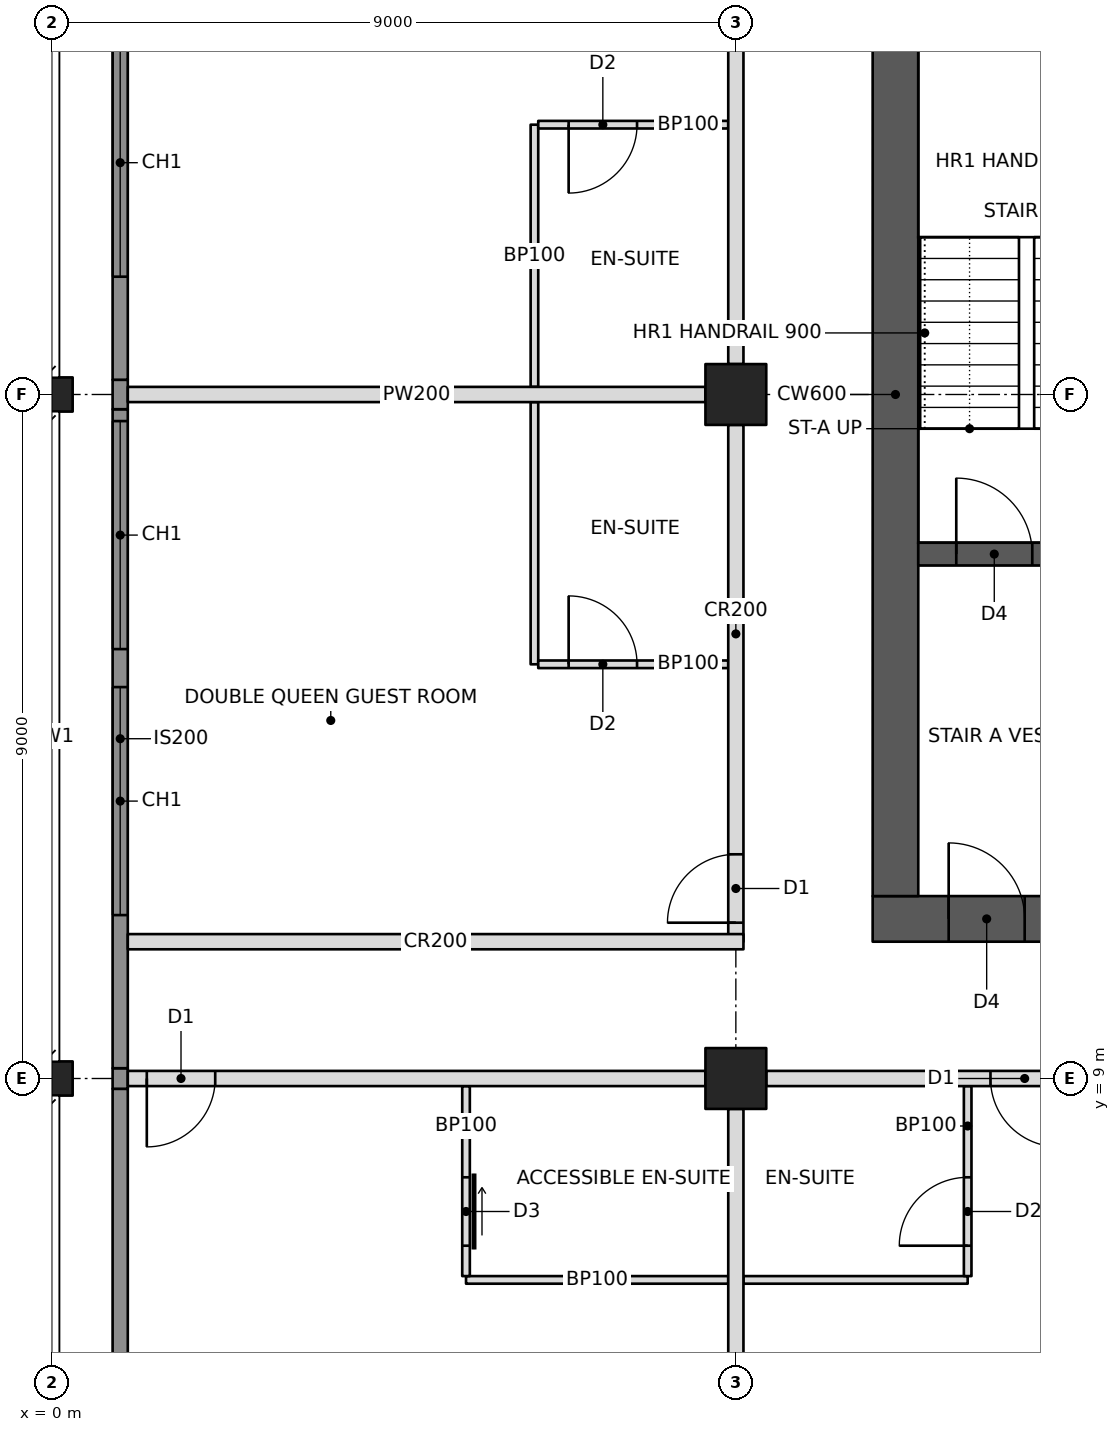
"""IFC4 building model, lengths in metres.
Left out: names, types, materials, properties, quantities, classifications, styles, units other than length and angle.
Written with IfcOpenShell. Run it as: python <this file> out.ifc"""

import sys

from ifc_helpers import new_model, si_unit, direction, frame, frame_2d, origin, origin_2d, place, context, subcontext, project, spatial, rectangle, hollow_rectangle, i_section, extrude, element, fill, save


model = new_model("IFC4")
c1 = context("Model", 3, precision=1e-05, world=origin(), true_north=direction((0.0, 1.0)))
c2 = subcontext(c1, "Body", "Model", "MODEL_VIEW")
j1 = project(units=[si_unit("LENGTHUNIT", "METRE"), si_unit("PLANEANGLEUNIT", "RADIAN")], contexts=[c1])
p1 = place(None, origin())
s1 = spatial("IfcSite", under=j1, at=p1, CompositionType="ELEMENT")
p2 = place(p1, origin())
s2 = spatial("IfcBuilding", under=s1, at=p2, CompositionType="ELEMENT")
p3 = place(p2, frame((0.0, 0.0, 187.6)))
s3 = spatial("IfcBuildingStorey", under=s2, at=p3, CompositionType="ELEMENT", Elevation=187.6)
for number, where, z_axis, x_axis in (
    (1, (0.0, 9.0, 0.0), (0.0, 0.0, 1.0), (0.0, 1.0, 0.0)),
    (2, (0.0, 18.0, 0.0), (0.0, 0.0, 1.0), (0.0, 1.0, 0.0)),
):
    element("IfcColumn", number, at=place(p3, frame(where, z_axis=z_axis, x_axis=x_axis)), inside=s3, PredefinedType="COLUMN", context=c2, shape_type="SweptSolid", body=[
        extrude(i_section(OverallWidth=0.449, OverallDepth=0.549, WebThickness=0.072, FlangeThickness=0.115, at=origin_2d()), origin(), (0.0, 0.0, 1.0), 3.4),
    ])
for number, where, z_axis, x_axis in (
    (3, (9.0, 9.0, 0.0), (0.0, 0.0, 1.0), (1.0, 0.0, 0.0)),
    (4, (9.0, 18.0, 0.0), (0.0, 0.0, 1.0), (1.0, 0.0, 0.0)),
):
    element("IfcColumn", number, at=place(p3, frame(where, z_axis=z_axis, x_axis=x_axis)), inside=s3, PredefinedType="COLUMN", context=c2, shape_type="SweptSolid", body=[
        extrude(hollow_rectangle(XDim=0.8, YDim=0.8, WallThickness=0.06, at=origin_2d()), origin(), (0.0, 0.0, 1.0), 3.4),
    ])
p4 = place(p3, frame((10.8, 11.1, 0.0), z_axis=(0.0, 0.0, 1.0), x_axis=(1.0, 0.0, 0.0)))
e5 = element("IfcWall", 5, at=p4, inside=s3, PredefinedType="SHEAR", context=c2, shape_type="SweptSolid", body=[
    extrude(rectangle(XDim=23.4, YDim=0.6, at=frame_2d((11.7, 0.0))), origin(), (0.0, 0.0, 1.0), 3.4),
])
p5 = place(p4, frame((1.0, 0.0, 0.0)))
e6 = element("IfcOpeningElement", 6, at=p5, cuts=e5, PredefinedType="OPENING", context=c2, shape_type="SweptSolid", body=[
    extrude(rectangle(XDim=1.0, YDim=2.1, at=frame_2d((0.5, 1.05))), frame((0.0, 0.31, 0.0), z_axis=(0.0, -1.0, 0.0), x_axis=(1.0, 0.0, 0.0)), (0.0, 0.0, 1.0), 0.62),
])
p6 = place(p4, frame((17.2, 0.0, 0.0)))
e7 = element("IfcOpeningElement", 7, at=p6, cuts=e5, PredefinedType="OPENING", context=c2, shape_type="SweptSolid", body=[
    extrude(rectangle(XDim=1.8, YDim=2.1, at=frame_2d((0.9, 1.05))), frame((0.0, 0.31, 0.0), z_axis=(0.0, -1.0, 0.0), x_axis=(1.0, 0.0, 0.0)), (0.0, 0.0, 1.0), 0.62),
])
p7 = place(p3, frame((11.1, 11.4, 0.0), z_axis=(0.0, 0.0, 1.0), x_axis=(0.0, 1.0, 0.0)))
e8 = element("IfcWall", 8, at=p7, inside=s3, PredefinedType="SHEAR", context=c2, shape_type="SweptSolid", body=[
    extrude(rectangle(XDim=13.2, YDim=0.6, at=frame_2d((6.6, 0.0))), origin(), (0.0, 0.0, 1.0), 3.4),
])
p8 = place(p3, frame((11.4, 15.9, 0.0), z_axis=(0.0, 0.0, 1.0), x_axis=(1.0, 0.0, 0.0)))
e9 = element("IfcWall", 9, at=p8, inside=s3, PredefinedType="SHEAR", context=c2, shape_type="SweptSolid", body=[
    extrude(rectangle(XDim=2.85, YDim=0.3, at=frame_2d((1.425, 0.0))), origin(), (0.0, 0.0, 1.0), 3.4),
])
p9 = place(p8, frame((0.5, 0.0, 0.0)))
e10 = element("IfcOpeningElement", 10, at=p9, cuts=e9, PredefinedType="OPENING", context=c2, shape_type="SweptSolid", body=[
    extrude(rectangle(XDim=1.0, YDim=2.1, at=frame_2d((0.5, 1.05))), frame((0.0, 0.16, 0.0), z_axis=(0.0, -1.0, 0.0), x_axis=(1.0, 0.0, 0.0)), (0.0, 0.0, 1.0), 0.32),
])
p10 = place(p3, frame((1.0, 9.0, 0.0), z_axis=(0.0, 0.0, 1.0), x_axis=(1.0, 0.0, 0.0)))
e11 = element("IfcWall", 11, at=p10, inside=s3, PredefinedType="PARTITIONING", context=c2, shape_type="SweptSolid", body=[
    extrude(rectangle(XDim=7.6, YDim=0.2, at=frame_2d((3.8, 0.0))), origin(), (0.0, 0.0, 1.0), 2.438),
])
p11 = place(p10, frame((0.25, 0.0, 0.0)))
e12 = element("IfcOpeningElement", 12, at=p11, cuts=e11, PredefinedType="OPENING", context=c2, shape_type="SweptSolid", body=[
    extrude(rectangle(XDim=0.9, YDim=2.1, at=frame_2d((0.45, 1.05))), frame((0.0, 0.11, 0.0), z_axis=(0.0, -1.0, 0.0), x_axis=(1.0, 0.0, 0.0)), (0.0, 0.0, 1.0), 0.22),
])
p12 = place(p3, frame((9.4, 9.0, 0.0), z_axis=(0.0, 0.0, 1.0), x_axis=(1.0, 0.0, 0.0)))
e13 = element("IfcWall", 13, at=p12, inside=s3, PredefinedType="PARTITIONING", context=c2, shape_type="SweptSolid", body=[
    extrude(rectangle(XDim=8.2, YDim=0.2, at=frame_2d((4.1, 0.0))), origin(), (0.0, 0.0, 1.0), 2.405),
])
p13 = place(p12, frame((2.95, 0.0, 0.0)))
e14 = element("IfcOpeningElement", 14, at=p13, cuts=e13, PredefinedType="OPENING", context=c2, shape_type="SweptSolid", body=[
    extrude(rectangle(XDim=0.9, YDim=2.1, at=frame_2d((0.45, 1.05))), frame((0.0, 0.11, 0.0), z_axis=(0.0, -1.0, 0.0), x_axis=(1.0, 0.0, 0.0)), (0.0, 0.0, 1.0), 0.22),
])
p14 = place(p12, frame((4.35, 0.0, 0.0)))
e15 = element("IfcOpeningElement", 15, at=p14, cuts=e13, PredefinedType="OPENING", context=c2, shape_type="SweptSolid", body=[
    extrude(rectangle(XDim=0.9, YDim=2.1, at=frame_2d((0.45, 1.05))), frame((0.0, 0.11, 0.0), z_axis=(0.0, -1.0, 0.0), x_axis=(1.0, 0.0, 0.0)), (0.0, 0.0, 1.0), 0.22),
])
p15 = place(p3, frame((9.0, 10.8, 0.0), z_axis=(0.0, 0.0, 1.0), x_axis=(0.0, 1.0, 0.0)))
e16 = element("IfcWall", 16, at=p15, inside=s3, PredefinedType="PARTITIONING", context=c2, shape_type="SweptSolid", body=[
    extrude(rectangle(XDim=6.8, YDim=0.2, at=frame_2d((3.4, 0.0))), origin(), (0.0, 0.0, 1.0), 2.405),
])
p16 = place(p15, frame((0.25, 0.0, 0.0)))
e17 = element("IfcOpeningElement", 17, at=p16, cuts=e16, PredefinedType="OPENING", context=c2, shape_type="SweptSolid", body=[
    extrude(rectangle(XDim=0.9, YDim=2.1, at=frame_2d((0.45, 1.05))), frame((0.0, 0.11, 0.0), z_axis=(0.0, -1.0, 0.0), x_axis=(1.0, 0.0, 0.0)), (0.0, 0.0, 1.0), 0.22),
])
p17 = place(p3, frame((9.0, 18.4, 0.0), z_axis=(0.0, 0.0, 1.0), x_axis=(0.0, 1.0, 0.0)))
e18 = element("IfcWall", 18, at=p17, inside=s3, PredefinedType="PARTITIONING", context=c2, shape_type="SweptSolid", body=[
    extrude(rectangle(XDim=8.2, YDim=0.2, at=frame_2d((4.1, 0.0))), origin(), (0.0, 0.0, 1.0), 2.405),
])
p18 = place(p17, frame((5.65, 0.0, 0.0)))
e19 = element("IfcOpeningElement", 19, at=p18, cuts=e18, PredefinedType="OPENING", context=c2, shape_type="SweptSolid", body=[
    extrude(rectangle(XDim=0.9, YDim=2.1, at=frame_2d((0.45, 1.05))), frame((0.0, 0.11, 0.0), z_axis=(0.0, -1.0, 0.0), x_axis=(1.0, 0.0, 0.0)), (0.0, 0.0, 1.0), 0.22),
])
p19 = place(p3, frame((1.0, 10.8, 0.0), z_axis=(0.0, 0.0, 1.0), x_axis=(1.0, 0.0, 0.0)))
e20 = element("IfcWall", 20, at=p19, inside=s3, PredefinedType="PARTITIONING", context=c2, shape_type="SweptSolid", body=[
    extrude(rectangle(XDim=8.1, YDim=0.2, at=frame_2d((4.05, 0.0))), origin(), (0.0, 0.0, 1.0), 2.404),
])
p20 = place(p3, frame((9.0, 8.6, 0.0), z_axis=(0.0, 0.0, 1.0), x_axis=(0.0, -1.0, 0.0)))
e21 = element("IfcWall", 21, at=p20, inside=s3, PredefinedType="PARTITIONING", context=c2, shape_type="SweptSolid", body=[
    extrude(rectangle(XDim=7.6, YDim=0.2, at=frame_2d((3.8, 0.0))), origin(), (0.0, 0.0, 1.0), 2.438),
])
p21 = place(p3, frame((5.45, 6.35, 0.0), z_axis=(0.0, 0.0, 1.0), x_axis=(1.0, 0.0, 0.0)))
e22 = element("IfcWall", 22, at=p21, inside=s3, PredefinedType="PARTITIONING", context=c2, shape_type="SweptSolid", body=[
    extrude(rectangle(XDim=3.45, YDim=0.1, at=frame_2d((1.725, 0.0))), origin(), (0.0, 0.0, 1.0), 2.438),
])
p22 = place(p3, frame((5.45, 8.9, 0.0), z_axis=(0.0, 0.0, 1.0), x_axis=(0.0, -1.0, 0.0)))
e23 = element("IfcWall", 23, at=p22, inside=s3, PredefinedType="PARTITIONING", context=c2, shape_type="SweptSolid", body=[
    extrude(rectangle(XDim=2.5, YDim=0.1, at=frame_2d((1.25, 0.0))), origin(), (0.0, 0.0, 1.0), 2.438),
])
p23 = place(p22, frame((1.2, 0.0, 0.0)))
e24 = element("IfcOpeningElement", 24, at=p23, cuts=e23, PredefinedType="OPENING", context=c2, shape_type="SweptSolid", body=[
    extrude(rectangle(XDim=0.9, YDim=2.1, at=frame_2d((0.45, 1.05))), frame((0.0, 0.06, 0.0), z_axis=(0.0, -1.0, 0.0), x_axis=(1.0, 0.0, 0.0)), (0.0, 0.0, 1.0), 0.12),
])
p24 = place(p3, frame((9.1, 6.35, 0.0), z_axis=(0.0, 0.0, 1.0), x_axis=(1.0, 0.0, 0.0)))
e25 = element("IfcWall", 25, at=p24, inside=s3, PredefinedType="PARTITIONING", context=c2, shape_type="SweptSolid", body=[
    extrude(rectangle(XDim=2.95, YDim=0.1, at=frame_2d((1.475, 0.0))), origin(), (0.0, 0.0, 1.0), 2.438),
])
p25 = place(p3, frame((12.05, 8.9, 0.0), z_axis=(0.0, 0.0, 1.0), x_axis=(0.0, -1.0, 0.0)))
e26 = element("IfcWall", 26, at=p25, inside=s3, PredefinedType="PARTITIONING", context=c2, shape_type="SweptSolid", body=[
    extrude(rectangle(XDim=2.5, YDim=0.1, at=frame_2d((1.25, 0.0))), origin(), (0.0, 0.0, 1.0), 2.404),
])
p26 = place(p25, frame((1.2, 0.0, 0.0)))
e27 = element("IfcOpeningElement", 27, at=p26, cuts=e26, PredefinedType="OPENING", context=c2, shape_type="SweptSolid", body=[
    extrude(rectangle(XDim=0.9, YDim=2.1, at=frame_2d((0.45, 1.05))), frame((0.0, 0.06, 0.0), z_axis=(0.0, -1.0, 0.0), x_axis=(1.0, 0.0, 0.0)), (0.0, 0.0, 1.0), 0.12),
])
p27 = place(p3, frame((8.6, 18.0, 0.0), z_axis=(0.0, 0.0, 1.0), x_axis=(-1.0, 0.0, 0.0)))
e28 = element("IfcWall", 28, at=p27, inside=s3, PredefinedType="PARTITIONING", context=c2, shape_type="SweptSolid", body=[
    extrude(rectangle(XDim=7.6, YDim=0.2, at=frame_2d((3.8, 0.0))), origin(), (0.0, 0.0, 1.0), 2.405),
])
p28 = place(p3, frame((6.35, 14.45, 0.0), z_axis=(0.0, 0.0, 1.0), x_axis=(0.0, 1.0, 0.0)))
e29 = element("IfcWall", 29, at=p28, inside=s3, PredefinedType="PARTITIONING", context=c2, shape_type="SweptSolid", body=[
    extrude(rectangle(XDim=3.45, YDim=0.1, at=frame_2d((1.725, 0.0))), origin(), (0.0, 0.0, 1.0), 2.404),
])
p29 = place(p3, frame((8.9, 14.45, 0.0), z_axis=(0.0, 0.0, 1.0), x_axis=(-1.0, 0.0, 0.0)))
e30 = element("IfcWall", 30, at=p29, inside=s3, PredefinedType="PARTITIONING", context=c2, shape_type="SweptSolid", body=[
    extrude(rectangle(XDim=2.5, YDim=0.1, at=frame_2d((1.25, 0.0))), origin(), (0.0, 0.0, 1.0), 2.404),
])
p30 = place(p29, frame((1.2, 0.0, 0.0)))
e31 = element("IfcOpeningElement", 31, at=p30, cuts=e30, PredefinedType="OPENING", context=c2, shape_type="SweptSolid", body=[
    extrude(rectangle(XDim=0.9, YDim=2.1, at=frame_2d((0.45, 1.05))), frame((0.0, 0.06, 0.0), z_axis=(0.0, -1.0, 0.0), x_axis=(1.0, 0.0, 0.0)), (0.0, 0.0, 1.0), 0.12),
])
p31 = place(p3, frame((6.35, 18.1, 0.0), z_axis=(0.0, 0.0, 1.0), x_axis=(0.0, 1.0, 0.0)))
e32 = element("IfcWall", 32, at=p31, inside=s3, PredefinedType="PARTITIONING", context=c2, shape_type="SweptSolid", body=[
    extrude(rectangle(XDim=3.45, YDim=0.1, at=frame_2d((1.725, 0.0))), origin(), (0.0, 0.0, 1.0), 2.404),
])
p32 = place(p3, frame((8.9, 21.55, 0.0), z_axis=(0.0, 0.0, 1.0), x_axis=(-1.0, 0.0, 0.0)))
e33 = element("IfcWall", 33, at=p32, inside=s3, PredefinedType="PARTITIONING", context=c2, shape_type="SweptSolid", body=[
    extrude(rectangle(XDim=2.5, YDim=0.1, at=frame_2d((1.25, 0.0))), origin(), (0.0, 0.0, 1.0), 2.404),
])
p33 = place(p32, frame((1.2, 0.0, 0.0)))
e34 = element("IfcOpeningElement", 34, at=p33, cuts=e33, PredefinedType="OPENING", context=c2, shape_type="SweptSolid", body=[
    extrude(rectangle(XDim=0.9, YDim=2.1, at=frame_2d((0.45, 1.05))), frame((0.0, 0.06, 0.0), z_axis=(0.0, -1.0, 0.0), x_axis=(1.0, 0.0, 0.0)), (0.0, 0.0, 1.0), 0.12),
])
p34 = place(p3, frame((0.9, 4.607, 0.0), z_axis=(0.0, 0.0, 1.0), x_axis=(0.0, 1.0, 0.0)))
e35 = element("IfcWall", 35, at=p34, inside=s3, PredefinedType="SOLIDWALL", context=c2, shape_type="SweptSolid", body=[
    extrude(rectangle(XDim=4.257, YDim=0.2, at=frame_2d((2.129, 0.0))), origin(), (0.0, 0.0, 1.0), 3.2),
])
p35 = place(p3, frame((0.9, 8.865, 0.0), z_axis=(0.0, 0.0, 1.0), x_axis=(0.0, 1.0, 0.0)))
e36 = element("IfcWall", 36, at=p35, inside=s3, PredefinedType="SOLIDWALL", context=c2, shape_type="SweptSolid", body=[
    extrude(rectangle(XDim=0.271, YDim=0.2, at=frame_2d((0.135, 0.0))), origin(), (0.0, 0.0, 1.0), 2.438),
])
p36 = place(p3, frame((0.9, 9.135, 0.0), z_axis=(0.0, 0.0, 1.0), x_axis=(0.0, 1.0, 0.0)))
e37 = element("IfcWall", 37, at=p36, inside=s3, PredefinedType="SOLIDWALL", context=c2, shape_type="SweptSolid", body=[
    extrude(rectangle(XDim=8.671, YDim=0.2, at=frame_2d((4.335, 0.0))), origin(), (0.0, 0.0, 1.0), 3.2),
])
p37 = place(p36, frame((2.015, 0.0, 0.6)))
e38 = element("IfcOpeningElement", 38, at=p37, cuts=e37, PredefinedType="OPENING", context=c2, shape_type="SweptSolid", body=[
    extrude(rectangle(XDim=3.0, YDim=2.2, at=frame_2d((1.5, 1.1))), frame((0.0, 0.11, 0.0), z_axis=(0.0, -1.0, 0.0), x_axis=(1.0, 0.0, 0.0)), (0.0, 0.0, 1.0), 0.22),
])
p38 = place(p36, frame((5.515, 0.0, 0.6)))
e39 = element("IfcOpeningElement", 39, at=p38, cuts=e37, PredefinedType="OPENING", context=c2, shape_type="SweptSolid", body=[
    extrude(rectangle(XDim=3.0, YDim=2.2, at=frame_2d((1.5, 1.1))), frame((0.0, 0.11, 0.0), z_axis=(0.0, -1.0, 0.0), x_axis=(1.0, 0.0, 0.0)), (0.0, 0.0, 1.0), 0.22),
])
p39 = place(p3, frame((0.9, 17.806, 0.0), z_axis=(0.0, 0.0, 1.0), x_axis=(0.0, 1.0, 0.0)))
e40 = element("IfcWall", 40, at=p39, inside=s3, PredefinedType="SOLIDWALL", context=c2, shape_type="SweptSolid", body=[
    extrude(rectangle(XDim=0.388, YDim=0.2, at=frame_2d((0.194, 0.0))), origin(), (0.0, 0.0, 1.0), 2.404),
])
p40 = place(p3, frame((0.9, 18.194, 0.0), z_axis=(0.0, 0.0, 1.0), x_axis=(0.0, 1.0, 0.0)))
e41 = element("IfcWall", 41, at=p40, inside=s3, PredefinedType="SOLIDWALL", context=c2, shape_type="SweptSolid", body=[
    extrude(rectangle(XDim=5.806, YDim=0.2, at=frame_2d((2.903, 0.0))), origin(), (0.0, 0.0, 1.0), 3.2),
])
p41 = place(p40, frame((1.356, 0.0, 0.6)))
e42 = element("IfcOpeningElement", 42, at=p41, cuts=e41, PredefinedType="OPENING", context=c2, shape_type="SweptSolid", body=[
    extrude(rectangle(XDim=3.0, YDim=2.2, at=frame_2d((1.5, 1.1))), frame((0.0, 0.11, 0.0), z_axis=(0.0, -1.0, 0.0), x_axis=(1.0, 0.0, 0.0)), (0.0, 0.0, 1.0), 0.22),
])
p42 = place(p37, origin())
e43 = element("IfcWindow", 43, at=p42, inside=s3, PartitioningType="TRIPLE_PANEL_VERTICAL", PredefinedType="WINDOW", context=c2, shape_type="SweptSolid", body=[
    extrude(rectangle(XDim=3.0, YDim=2.2, at=frame_2d((1.5, 1.1))), frame((0.0, 0.03, 0.0), z_axis=(0.0, -1.0, 0.0), x_axis=(1.0, 0.0, 0.0)), (0.0, 0.0, 1.0), 0.06),
])
fill(e38, e43)
p43 = place(p38, origin())
e44 = element("IfcWindow", 44, at=p43, inside=s3, PartitioningType="TRIPLE_PANEL_VERTICAL", PredefinedType="WINDOW", context=c2, shape_type="SweptSolid", body=[
    extrude(rectangle(XDim=3.0, YDim=2.2, at=frame_2d((1.5, 1.1))), frame((0.0, 0.03, 0.0), z_axis=(0.0, -1.0, 0.0), x_axis=(1.0, 0.0, 0.0)), (0.0, 0.0, 1.0), 0.06),
])
fill(e39, e44)
p44 = place(p41, origin())
e45 = element("IfcWindow", 45, at=p44, inside=s3, PartitioningType="TRIPLE_PANEL_VERTICAL", PredefinedType="WINDOW", context=c2, shape_type="SweptSolid", body=[
    extrude(rectangle(XDim=3.0, YDim=2.2, at=frame_2d((1.5, 1.1))), frame((0.0, 0.03, 0.0), z_axis=(0.0, -1.0, 0.0), x_axis=(1.0, 0.0, 0.0)), (0.0, 0.0, 1.0), 0.06),
])
fill(e42, e45)
p45 = place(p23, origin())
e46 = element("IfcDoor", 46, at=p45, inside=s3, OperationType="SLIDING_TO_LEFT", PredefinedType="DOOR", context=c2, shape_type="SweptSolid", body=[
    extrude(rectangle(XDim=0.9, YDim=2.1, at=frame_2d((0.45, 1.05))), frame((0.0, 0.025, 0.0), z_axis=(0.0, -1.0, 0.0), x_axis=(1.0, 0.0, 0.0)), (0.0, 0.0, 1.0), 0.05),
])
fill(e24, e46)
p46 = place(p11, frame((0.9, 0.0, 0.0), z_axis=(0.0, 0.0, 1.0), x_axis=(-1.0, 0.0, 0.0)))
e47 = element("IfcDoor", 47, at=p46, inside=s3, OperationType="SINGLE_SWING_RIGHT", PredefinedType="DOOR", context=c2, shape_type="SweptSolid", body=[
    extrude(rectangle(XDim=0.9, YDim=2.1, at=frame_2d((0.45, 1.05))), frame((0.0, 0.025, 0.0), z_axis=(0.0, -1.0, 0.0), x_axis=(1.0, 0.0, 0.0)), (0.0, 0.0, 1.0), 0.05),
])
fill(e12, e47)
p47 = place(p26, frame((0.9, 0.0, 0.0), z_axis=(0.0, 0.0, 1.0), x_axis=(-1.0, 0.0, 0.0)))
e48 = element("IfcDoor", 48, at=p47, inside=s3, OperationType="SINGLE_SWING_LEFT", PredefinedType="DOOR", context=c2, shape_type="SweptSolid", body=[
    extrude(rectangle(XDim=0.9, YDim=2.1, at=frame_2d((0.45, 1.05))), frame((0.0, 0.025, 0.0), z_axis=(0.0, -1.0, 0.0), x_axis=(1.0, 0.0, 0.0)), (0.0, 0.0, 1.0), 0.05),
])
fill(e27, e48)
p48 = place(p13, frame((0.9, 0.0, 0.0), z_axis=(0.0, 0.0, 1.0), x_axis=(-1.0, 0.0, 0.0)))
e49 = element("IfcDoor", 49, at=p48, inside=s3, OperationType="SINGLE_SWING_LEFT", PredefinedType="DOOR", context=c2, shape_type="SweptSolid", body=[
    extrude(rectangle(XDim=0.9, YDim=2.1, at=frame_2d((0.45, 1.05))), frame((0.0, 0.025, 0.0), z_axis=(0.0, -1.0, 0.0), x_axis=(1.0, 0.0, 0.0)), (0.0, 0.0, 1.0), 0.05),
])
fill(e14, e49)
p49 = place(p30, frame((0.9, 0.0, 0.0), z_axis=(0.0, 0.0, 1.0), x_axis=(-1.0, 0.0, 0.0)))
e50 = element("IfcDoor", 50, at=p49, inside=s3, OperationType="SINGLE_SWING_LEFT", PredefinedType="DOOR", context=c2, shape_type="SweptSolid", body=[
    extrude(rectangle(XDim=0.9, YDim=2.1, at=frame_2d((0.45, 1.05))), frame((0.0, 0.025, 0.0), z_axis=(0.0, -1.0, 0.0), x_axis=(1.0, 0.0, 0.0)), (0.0, 0.0, 1.0), 0.05),
])
fill(e31, e50)
p50 = place(p16, origin())
e51 = element("IfcDoor", 51, at=p50, inside=s3, OperationType="SINGLE_SWING_LEFT", PredefinedType="DOOR", context=c2, shape_type="SweptSolid", body=[
    extrude(rectangle(XDim=0.9, YDim=2.1, at=frame_2d((0.45, 1.05))), frame((0.0, 0.025, 0.0), z_axis=(0.0, -1.0, 0.0), x_axis=(1.0, 0.0, 0.0)), (0.0, 0.0, 1.0), 0.05),
])
fill(e17, e51)
p51 = place(p33, origin())
e52 = element("IfcDoor", 52, at=p51, inside=s3, OperationType="SINGLE_SWING_RIGHT", PredefinedType="DOOR", context=c2, shape_type="SweptSolid", body=[
    extrude(rectangle(XDim=0.9, YDim=2.1, at=frame_2d((0.45, 1.05))), frame((0.0, 0.025, 0.0), z_axis=(0.0, -1.0, 0.0), x_axis=(1.0, 0.0, 0.0)), (0.0, 0.0, 1.0), 0.05),
])
fill(e34, e52)
p52 = place(p5, origin())
e53 = element("IfcDoor", 53, at=p52, inside=s3, OperationType="SINGLE_SWING_LEFT", PredefinedType="DOOR", context=c2, shape_type="SweptSolid", body=[
    extrude(rectangle(XDim=1.0, YDim=2.1, at=frame_2d((0.5, 1.05))), frame((0.0, 0.025, 0.0), z_axis=(0.0, -1.0, 0.0), x_axis=(1.0, 0.0, 0.0)), (0.0, 0.0, 1.0), 0.05),
])
fill(e6, e53)
p53 = place(p9, origin())
e54 = element("IfcDoor", 54, at=p53, inside=s3, OperationType="SINGLE_SWING_LEFT", PredefinedType="DOOR", context=c2, shape_type="SweptSolid", body=[
    extrude(rectangle(XDim=1.0, YDim=2.1, at=frame_2d((0.5, 1.05))), frame((0.0, 0.025, 0.0), z_axis=(0.0, -1.0, 0.0), x_axis=(1.0, 0.0, 0.0)), (0.0, 0.0, 1.0), 0.05),
])
fill(e10, e54)
save(model, sys.argv[1])
